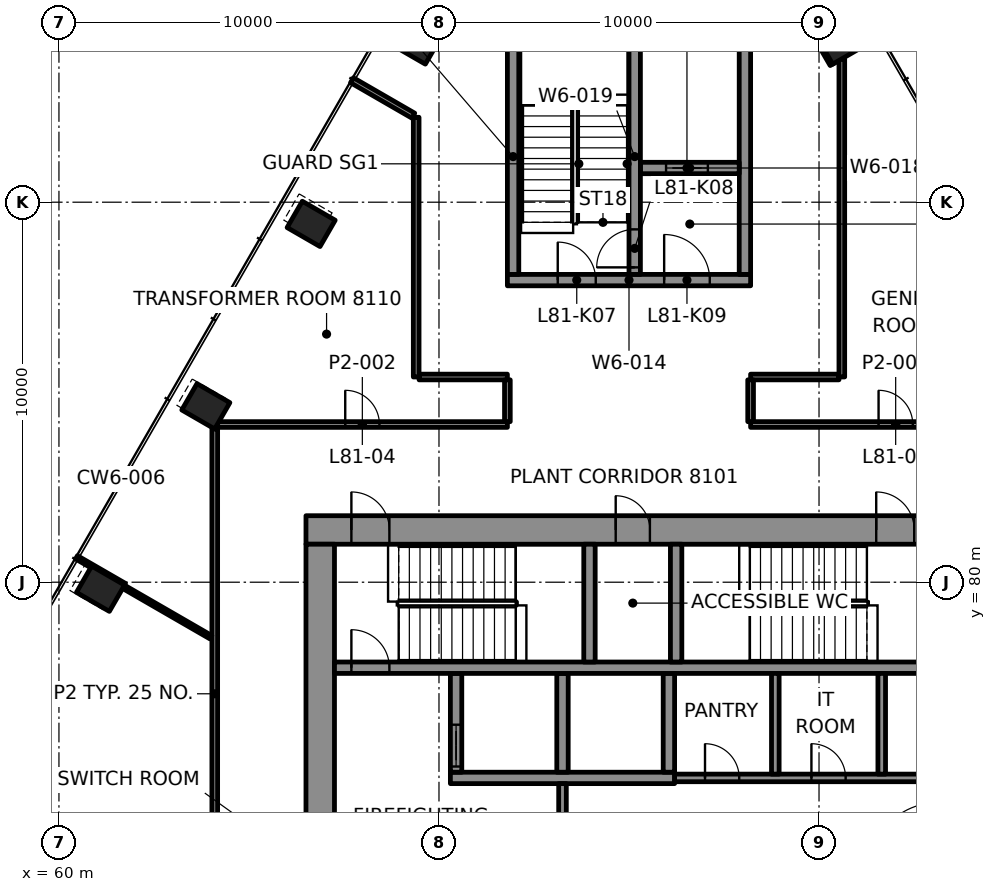
"""IFC4 building model, lengths in metres.
Left out: names, types, materials, properties, quantities, classifications, styles, units other than length and angle.
Written with IfcOpenShell. Run it as: python <this file> out.ifc"""

import sys

from ifc_helpers import new_model, si_unit, direction, frame, frame_2d, origin, origin_2d, place, context, subcontext, project, spatial, rectangle, hollow_rectangle, extrude, element, fill, save


model = new_model("IFC4")
c1 = context("Model", 3, precision=1e-05, world=origin(), true_north=direction((0.0, 1.0)))
c2 = subcontext(c1, "Body", "Model", "MODEL_VIEW")
j1 = project(units=[si_unit("LENGTHUNIT", "METRE"), si_unit("PLANEANGLEUNIT", "RADIAN")], contexts=[c1])
p1 = place(None, origin())
s1 = spatial("IfcSite", under=j1, at=p1, CompositionType="ELEMENT")
p2 = place(p1, origin())
s2 = spatial("IfcBuilding", under=s1, at=p2, CompositionType="ELEMENT")
p3 = place(p2, frame((0.0, 0.0, 331.6)))
s3 = spatial("IfcBuildingStorey", under=s2, at=p3, CompositionType="ELEMENT", Elevation=331.6)
for number, where, z_axis, x_axis in (
    (1, (80.592, 94.229, -0.0), (0.0, 0.0, 1.0), (-0.5, 0.866, 0.0)),
    (2, (69.408, 94.229, -0.0), (0.0, 0.0, 1.0), (-0.5, -0.866, 0.0)),
    (3, (66.636, 89.429, -0.0), (0.0, 0.0, 1.0), (-0.5, -0.866, 0.0)),
    (4, (63.865, 84.629, -0.0), (0.0, 0.0, 1.0), (-0.5, -0.866, 0.0)),
    (5, (61.094, 79.829, -0.0), (0.0, 0.0, 1.0), (-0.5, -0.866, 0.0)),
):
    element("IfcColumn", number, at=place(p3, frame(where, z_axis=z_axis, x_axis=x_axis)), inside=s3, PredefinedType="COLUMN", context=c2, shape_type="SweptSolid", body=[
        extrude(hollow_rectangle(XDim=0.8, YDim=1.0, WallThickness=0.05, at=origin_2d()), origin(), (0.0, 0.0, 1.0), 4.0),
    ])
p4 = place(p3, frame((66.5, 81.375, 0.0), z_axis=(0.0, 0.0, 1.0), x_axis=(1.0, 0.0, 0.0)))
e6 = element("IfcWall", 6, at=p4, inside=s3, PredefinedType="SHEAR", context=c2, shape_type="SweptSolid", body=[
    extrude(rectangle(XDim=17.0, YDim=0.75, at=frame_2d((8.5, 0.0))), origin(), (0.0, 0.0, 1.0), 3.7),
])
p5 = place(p4, frame((1.195, 0.0, 0.0)))
e7 = element("IfcOpeningElement", 7, at=p5, cuts=e6, PredefinedType="OPENING", context=c2, shape_type="SweptSolid", body=[
    extrude(rectangle(XDim=1.0, YDim=2.1, at=frame_2d((0.5, 1.05))), frame((0.0, 0.385, 0.0), z_axis=(0.0, -1.0, 0.0), x_axis=(1.0, 0.0, 0.0)), (0.0, 0.0, 1.0), 0.77),
])
p6 = place(p4, frame((15.005, 0.0, 0.0)))
e8 = element("IfcOpeningElement", 8, at=p6, cuts=e6, PredefinedType="OPENING", context=c2, shape_type="SweptSolid", body=[
    extrude(rectangle(XDim=1.0, YDim=2.1, at=frame_2d((0.5, 1.05))), frame((0.0, 0.385, 0.0), z_axis=(0.0, -1.0, 0.0), x_axis=(1.0, 0.0, 0.0)), (0.0, 0.0, 1.0), 0.77),
])
p7 = place(p4, frame((8.15, 0.0, 0.0)))
e9 = element("IfcOpeningElement", 9, at=p7, cuts=e6, PredefinedType="OPENING", context=c2, shape_type="SweptSolid", body=[
    extrude(rectangle(XDim=0.9, YDim=2.1, at=frame_2d((0.45, 1.05))), frame((0.0, 0.385, 0.0), z_axis=(0.0, -1.0, 0.0), x_axis=(1.0, 0.0, 0.0)), (0.0, 0.0, 1.0), 0.77),
])
p8 = place(p3, frame((66.875, 69.0, 0.0), z_axis=(0.0, 0.0, 1.0), x_axis=(0.0, 1.0, 0.0)))
e10 = element("IfcWall", 10, at=p8, inside=s3, PredefinedType="SHEAR", context=c2, shape_type="SweptSolid", body=[
    extrude(rectangle(XDim=12.0, YDim=0.75, at=frame_2d((6.0, 0.0))), origin(), (0.0, 0.0, 1.0), 3.7),
])
p9 = place(p8, frame((3.7, 0.0, 0.0)))
e11 = element("IfcOpeningElement", 11, at=p9, cuts=e10, PredefinedType="OPENING", context=c2, shape_type="SweptSolid", body=[
    extrude(rectangle(XDim=1.2, YDim=2.1, at=frame_2d((0.6, 1.05))), frame((0.0, 0.385, 0.0), z_axis=(0.0, -1.0, 0.0), x_axis=(1.0, 0.0, 0.0)), (0.0, 0.0, 1.0), 0.77),
])
p10 = place(p8, frame((0.925, 0.0, 0.0)))
e12 = element("IfcOpeningElement", 12, at=p10, cuts=e10, PredefinedType="OPENING", context=c2, shape_type="SweptSolid", body=[
    extrude(rectangle(XDim=0.9, YDim=2.1, at=frame_2d((0.45, 1.05))), frame((0.0, 0.385, 0.0), z_axis=(0.0, -1.0, 0.0), x_axis=(1.0, 0.0, 0.0)), (0.0, 0.0, 1.0), 0.77),
])
p11 = place(p3, frame((70.3, 74.85, 0.0), z_axis=(0.0, 0.0, 1.0), x_axis=(1.0, 0.0, 0.0)))
e13 = element("IfcWall", 13, at=p11, inside=s3, PredefinedType="SHEAR", context=c2, shape_type="SweptSolid", body=[
    extrude(rectangle(XDim=5.9, YDim=0.3, at=frame_2d((2.95, 0.0))), origin(), (0.0, 0.0, 1.0), 3.7),
])
p12 = place(p3, frame((70.45, 75.0, 0.0), z_axis=(0.0, 0.0, 1.0), x_axis=(0.0, 1.0, 0.0)))
e14 = element("IfcWall", 14, at=p12, inside=s3, PredefinedType="SHEAR", context=c2, shape_type="SweptSolid", body=[
    extrude(rectangle(XDim=2.6, YDim=0.3, at=frame_2d((1.3, 0.0))), origin(), (0.0, 0.0, 1.0), 3.7),
])
p13 = place(p12, frame((0.15, 0.0, 0.0)))
e15 = element("IfcOpeningElement", 15, at=p13, cuts=e14, PredefinedType="OPENING", context=c2, shape_type="SweptSolid", body=[
    extrude(rectangle(XDim=1.1, YDim=2.1, at=frame_2d((0.55, 1.05))), frame((0.0, 0.16, 0.0), z_axis=(0.0, -1.0, 0.0), x_axis=(1.0, 0.0, 0.0)), (0.0, 0.0, 1.0), 0.32),
])
for number, where, z_axis, x_axis in (
    (16, (73.25, 75.0, 0.0), (0.0, 0.0, 1.0), (0.0, 1.0, 0.0)),
    (17, (76.05, 75.0, 0.0), (0.0, 0.0, 1.0), (0.0, 1.0, 0.0)),
):
    element("IfcWall", number, at=place(p3, frame(where, z_axis=z_axis, x_axis=x_axis)), inside=s3, PredefinedType="SHEAR", context=c2, shape_type="SweptSolid", body=[
        extrude(rectangle(XDim=2.6, YDim=0.3, at=frame_2d((1.3, 0.0))), origin(), (0.0, 0.0, 1.0), 3.7),
    ])
p14 = place(p3, frame((67.25, 77.75, 0.0), z_axis=(0.0, 0.0, 1.0), x_axis=(1.0, 0.0, 0.0)))
e18 = element("IfcWall", 18, at=p14, inside=s3, PredefinedType="SHEAR", context=c2, shape_type="SweptSolid", body=[
    extrude(rectangle(XDim=15.5, YDim=0.3, at=frame_2d((7.75, 0.0))), origin(), (0.0, 0.0, 1.0), 3.7),
])
p15 = place(p14, frame((0.445, 0.0, 0.0)))
e19 = element("IfcOpeningElement", 19, at=p15, cuts=e18, PredefinedType="OPENING", context=c2, shape_type="SweptSolid", body=[
    extrude(rectangle(XDim=1.0, YDim=2.1, at=frame_2d((0.5, 1.05))), frame((0.0, 0.16, 0.0), z_axis=(0.0, -1.0, 0.0), x_axis=(1.0, 0.0, 0.0)), (0.0, 0.0, 1.0), 0.32),
])
for number, where, z_axis, x_axis in (
    (20, (73.96, 77.9, 0.0), (0.0, 0.0, 1.0), (0.0, 1.0, 0.0)),
    (21, (76.24, 77.9, 0.0), (0.0, 0.0, 1.0), (0.0, 1.0, 0.0)),
):
    element("IfcWall", number, at=place(p3, frame(where, z_axis=z_axis, x_axis=x_axis)), inside=s3, PredefinedType="SHEAR", context=c2, shape_type="SweptSolid", body=[
        extrude(rectangle(XDim=3.1, YDim=0.3, at=frame_2d((1.55, 0.0))), origin(), (0.0, 0.0, 1.0), 3.7),
    ])
p16 = place(p3, frame((71.8, 87.95, 0.0), z_axis=(0.0, 0.0, 1.0), x_axis=(1.0, 0.0, 0.0)))
e22 = element("IfcWall", 22, at=p16, inside=s3, PredefinedType="SHEAR", context=c2, shape_type="SweptSolid", body=[
    extrude(rectangle(XDim=6.4, YDim=0.3, at=frame_2d((3.2, 0.0))), origin(), (0.0, 0.0, 1.0), 3.7),
])
p17 = place(p16, frame((1.325, 0.0, 0.0)))
e23 = element("IfcOpeningElement", 23, at=p17, cuts=e22, PredefinedType="OPENING", context=c2, shape_type="SweptSolid", body=[
    extrude(rectangle(XDim=1.0, YDim=2.1, at=frame_2d((0.5, 1.05))), frame((0.0, 0.16, 0.0), z_axis=(0.0, -1.0, 0.0), x_axis=(1.0, 0.0, 0.0)), (0.0, 0.0, 1.0), 0.32),
])
p18 = place(p16, frame((4.125, 0.0, 0.0)))
e24 = element("IfcOpeningElement", 24, at=p18, cuts=e22, PredefinedType="OPENING", context=c2, shape_type="SweptSolid", body=[
    extrude(rectangle(XDim=1.2, YDim=2.1, at=frame_2d((0.6, 1.05))), frame((0.0, 0.16, 0.0), z_axis=(0.0, -1.0, 0.0), x_axis=(1.0, 0.0, 0.0)), (0.0, 0.0, 1.0), 0.32),
])
for number, where, z_axis, x_axis in (
    (25, (71.95, 88.1, 0.0), (0.0, 0.0, 1.0), (0.0, 1.0, 0.0)),
    (26, (78.05, 88.1, 0.0), (0.0, 0.0, 1.0), (0.0, 1.0, 0.0)),
):
    element("IfcWall", number, at=place(p3, frame(where, z_axis=z_axis, x_axis=x_axis)), inside=s3, PredefinedType="SHEAR", context=c2, shape_type="SweptSolid", body=[
        extrude(rectangle(XDim=6.2, YDim=0.3, at=frame_2d((3.1, 0.0))), origin(), (0.0, 0.0, 1.0), 3.7),
    ])
p19 = place(p3, frame((75.3, 90.9, 0.0), z_axis=(0.0, 0.0, 1.0), x_axis=(1.0, 0.0, 0.0)))
e27 = element("IfcWall", 27, at=p19, inside=s3, PredefinedType="SHEAR", context=c2, shape_type="SweptSolid", body=[
    extrude(rectangle(XDim=2.6, YDim=0.3, at=frame_2d((1.3, 0.0))), origin(), (0.0, 0.0, 1.0), 3.7),
])
p20 = place(p19, frame((0.675, 0.0, 0.0)))
e28 = element("IfcOpeningElement", 28, at=p20, cuts=e27, PredefinedType="OPENING", context=c2, shape_type="SweptSolid", body=[
    extrude(rectangle(XDim=1.1, YDim=2.1, at=frame_2d((0.55, 1.05))), frame((0.0, 0.16, 0.0), z_axis=(0.0, -1.0, 0.0), x_axis=(1.0, 0.0, 0.0)), (0.0, 0.0, 1.0), 0.32),
])
p21 = place(p3, frame((75.15, 88.1, 0.0), z_axis=(0.0, 0.0, 1.0), x_axis=(0.0, 1.0, 0.0)))
e29 = element("IfcWall", 29, at=p21, inside=s3, PredefinedType="SHEAR", context=c2, shape_type="SweptSolid", body=[
    extrude(rectangle(XDim=6.2, YDim=0.3, at=frame_2d((3.1, 0.0))), origin(), (0.0, 0.0, 1.0), 3.7),
])
p22 = place(p21, frame((0.185, 0.0, 0.0)))
e30 = element("IfcOpeningElement", 30, at=p22, cuts=e29, PredefinedType="OPENING", context=c2, shape_type="SweptSolid", body=[
    extrude(rectangle(XDim=1.0, YDim=2.1, at=frame_2d((0.5, 1.05))), frame((0.0, 0.16, 0.0), z_axis=(0.0, -1.0, 0.0), x_axis=(1.0, 0.0, 0.0)), (0.0, 0.0, 1.0), 0.32),
])
p23 = place(p3, frame((64.166, 84.15, 0.0), z_axis=(0.0, 0.0, 1.0), x_axis=(1.0, 0.0, 0.0)))
e31 = element("IfcWall", 31, at=p23, inside=s3, PredefinedType="PARTITIONING", context=c2, shape_type="SweptSolid", body=[
    extrude(rectangle(XDim=7.634, YDim=0.15, at=frame_2d((3.817, 0.0))), origin(), (0.0, 0.0, 1.0), 3.1),
])
p24 = place(p23, frame((3.367, 0.0, 0.0)))
e32 = element("IfcOpeningElement", 32, at=p24, cuts=e31, PredefinedType="OPENING", context=c2, shape_type="SweptSolid", body=[
    extrude(rectangle(XDim=0.9, YDim=2.1, at=frame_2d((0.45, 1.05))), frame((0.0, 0.085, 0.0), z_axis=(0.0, -1.0, 0.0), x_axis=(1.0, 0.0, 0.0)), (0.0, 0.0, 1.0), 0.17),
])
p25 = place(p3, frame((78.2, 84.15, 0.0), z_axis=(0.0, 0.0, 1.0), x_axis=(1.0, 0.0, 0.0)))
e33 = element("IfcWall", 33, at=p25, inside=s3, PredefinedType="PARTITIONING", context=c2, shape_type="SweptSolid", body=[
    extrude(rectangle(XDim=7.634, YDim=0.15, at=frame_2d((3.817, 0.0))), origin(), (0.0, 0.0, 1.0), 3.1),
])
p26 = place(p25, frame((3.367, 0.0, 0.0)))
e34 = element("IfcOpeningElement", 34, at=p26, cuts=e33, PredefinedType="OPENING", context=c2, shape_type="SweptSolid", body=[
    extrude(rectangle(XDim=0.9, YDim=2.1, at=frame_2d((0.45, 1.05))), frame((0.0, 0.085, 0.0), z_axis=(0.0, -1.0, 0.0), x_axis=(1.0, 0.0, 0.0)), (0.0, 0.0, 1.0), 0.17),
])
for number, where, z_axis, x_axis in (
    (35, (69.476, 85.4, 0.0), (0.0, 0.0, 1.0), (1.0, 0.0, 0.0)),
    (36, (78.2, 85.4, 0.0), (0.0, 0.0, 1.0), (1.0, 0.0, 0.0)),
):
    element("IfcWall", number, at=place(p3, frame(where, z_axis=z_axis, x_axis=x_axis)), inside=s3, PredefinedType="PARTITIONING", context=c2, shape_type="SweptSolid", body=[
        extrude(rectangle(XDim=2.324, YDim=0.15, at=frame_2d((1.162, 0.0))), origin(), (0.0, 0.0, 1.0), 3.1),
    ])
p27 = place(p3, frame((80.6, 85.401, 0.0), z_axis=(0.0, 0.0, 1.0), x_axis=(0.0, 1.0, 0.0)))
e37 = element("IfcWall", 37, at=p27, inside=s3, PredefinedType="PARTITIONING", context=c2, shape_type="SweptSolid", body=[
    extrude(rectangle(XDim=8.371, YDim=0.15, at=frame_2d((4.185, 0.0))), origin(), (0.0, 0.0, 1.0), 3.1),
])
for number, where, z_axis, x_axis in (
    (38, (78.2, 84.225, 0.0), (0.0, 0.0, 1.0), (0.0, 1.0, 0.0)),
    (39, (71.8, 84.225, 0.0), (0.0, 0.0, 1.0), (0.0, 1.0, 0.0)),
):
    element("IfcWall", number, at=place(p3, frame(where, z_axis=z_axis, x_axis=x_axis)), inside=s3, PredefinedType="PARTITIONING", context=c2, shape_type="SweptSolid", body=[
        extrude(rectangle(XDim=1.1, YDim=0.15, at=frame_2d((0.55, 0.0))), origin(), (0.0, 0.0, 1.0), 3.1),
    ])
p28 = place(p3, frame((69.4, 85.4, 0.0), z_axis=(0.0, 0.0, 1.0), x_axis=(0.0, 1.0, 0.0)))
e40 = element("IfcWall", 40, at=p28, inside=s3, PredefinedType="PARTITIONING", context=c2, shape_type="SweptSolid", body=[
    extrude(rectangle(XDim=6.833, YDim=0.15, at=frame_2d((3.417, 0.0))), origin(), (0.0, 0.0, 1.0), 3.1),
])
p29 = place(p3, frame((64.1, 70.093, 0.0), z_axis=(0.0, 0.0, 1.0), x_axis=(0.0, 1.0, 0.0)))
e41 = element("IfcWall", 41, at=p29, inside=s3, PredefinedType="PARTITIONING", context=c2, shape_type="SweptSolid", body=[
    extrude(rectangle(XDim=13.943, YDim=0.15, at=frame_2d((6.972, 0.0))), origin(), (0.0, 0.0, 1.0), 3.1),
])
p30 = place(p3, frame((80.358, 93.633, 0.0), z_axis=(0.0, 0.0, 1.0), x_axis=(-0.499951716245, 0.866053278629, 0.0)))
e42 = element("IfcWall", 42, at=p30, inside=s3, PredefinedType="PARTITIONING", context=c2, shape_type="SweptSolid", body=[
    extrude(rectangle(XDim=0.799, YDim=0.15, at=frame_2d((0.399, 0.0))), origin(), (0.0, 0.0, 1.0), 3.1),
])
p31 = place(p3, frame((69.325, 92.277, 0.0), z_axis=(0.0, 0.0, 1.0), x_axis=(-0.865993641626, 0.500055009638, 0.0)))
e43 = element("IfcWall", 43, at=p31, inside=s3, PredefinedType="PARTITIONING", context=c2, shape_type="SweptSolid", body=[
    extrude(rectangle(XDim=1.864, YDim=0.15, at=frame_2d((0.932, 0.0))), origin(), (0.0, 0.0, 1.0), 3.088),
])
p32 = place(p3, frame((61.726, 79.925, 0.0), z_axis=(0.0, 0.0, 1.0), x_axis=(-0.866021227388, 0.500007233661, 0.0)))
e44 = element("IfcWall", 44, at=p32, inside=s3, PredefinedType="PARTITIONING", context=c2, shape_type="SweptSolid", body=[
    extrude(rectangle(XDim=1.459, YDim=0.1, at=frame_2d((0.73, 0.0))), origin(), (0.0, 0.0, 1.0), 3.088),
])
p33 = place(p3, frame((63.999, 78.551, 0.0), z_axis=(0.0, 0.0, 1.0), x_axis=(-0.866015557117, 0.50001705454, 0.0)))
e45 = element("IfcWall", 45, at=p33, inside=s3, PredefinedType="PARTITIONING", context=c2, shape_type="SweptSolid", body=[
    extrude(rectangle(XDim=2.654, YDim=0.1, at=frame_2d((1.327, 0.0))), origin(), (0.0, 0.0, 1.0), 3.1),
])
p34 = place(p3, frame((76.2, 74.85, 0.0), z_axis=(0.0, 0.0, 1.0), x_axis=(1.0, 0.0, 0.0)))
e46 = element("IfcWall", 46, at=p34, inside=s3, PredefinedType="PARTITIONING", context=c2, shape_type="SweptSolid", body=[
    extrude(rectangle(XDim=6.55, YDim=0.2, at=frame_2d((3.275, 0.0))), origin(), (0.0, 0.0, 1.0), 3.7),
])
p35 = place(p34, frame((0.8, 0.0, 0.0)))
e47 = element("IfcOpeningElement", 47, at=p35, cuts=e46, PredefinedType="OPENING", context=c2, shape_type="SweptSolid", body=[
    extrude(rectangle(XDim=0.9, YDim=2.1, at=frame_2d((0.45, 1.05))), frame((0.0, 0.11, 0.0), z_axis=(0.0, -1.0, 0.0), x_axis=(1.0, 0.0, 0.0)), (0.0, 0.0, 1.0), 0.22),
])
p36 = place(p34, frame((3.6, 0.0, 0.0)))
e48 = element("IfcOpeningElement", 48, at=p36, cuts=e46, PredefinedType="OPENING", context=c2, shape_type="SweptSolid", body=[
    extrude(rectangle(XDim=0.9, YDim=2.1, at=frame_2d((0.45, 1.05))), frame((0.0, 0.11, 0.0), z_axis=(0.0, -1.0, 0.0), x_axis=(1.0, 0.0, 0.0)), (0.0, 0.0, 1.0), 0.22),
])
p37 = place(p3, frame((73.25, 71.9, 0.0), z_axis=(0.0, 0.0, 1.0), x_axis=(0.0, 1.0, 0.0)))
e49 = element("IfcWall", 49, at=p37, inside=s3, PredefinedType="PARTITIONING", context=c2, shape_type="SweptSolid", body=[
    extrude(rectangle(XDim=2.8, YDim=0.2, at=frame_2d((1.4, 0.0))), origin(), (0.0, 0.0, 1.0), 3.7),
])
p38 = place(p37, frame((0.8, 0.0, 0.0)))
e50 = element("IfcOpeningElement", 50, at=p38, cuts=e49, PredefinedType="OPENING", context=c2, shape_type="SweptSolid", body=[
    extrude(rectangle(XDim=1.2, YDim=2.1, at=frame_2d((0.6, 1.05))), frame((0.0, 0.11, 0.0), z_axis=(0.0, -1.0, 0.0), x_axis=(1.0, 0.0, 0.0)), (0.0, 0.0, 1.0), 0.22),
])
for number, where, z_axis, x_axis in (
    (51, (78.85, 74.95, 0.0), (0.0, 0.0, 1.0), (0.0, 1.0, 0.0)),
    (52, (81.65, 74.95, 0.0), (0.0, 0.0, 1.0), (0.0, 1.0, 0.0)),
):
    element("IfcWall", number, at=place(p3, frame(where, z_axis=z_axis, x_axis=x_axis)), inside=s3, PredefinedType="PARTITIONING", context=c2, shape_type="SweptSolid", body=[
        extrude(rectangle(XDim=2.65, YDim=0.2, at=frame_2d((1.325, 0.0))), origin(), (0.0, 0.0, 1.0), 3.7),
    ])
p39 = place(p24, origin())
e53 = element("IfcDoor", 53, at=p39, inside=s3, OperationType="SINGLE_SWING_LEFT", PredefinedType="DOOR", context=c2, shape_type="SweptSolid", body=[
    extrude(rectangle(XDim=0.9, YDim=2.1, at=frame_2d((0.45, 1.05))), frame((0.0, 0.025, 0.0), z_axis=(0.0, -1.0, 0.0), x_axis=(1.0, 0.0, 0.0)), (0.0, 0.0, 1.0), 0.05),
])
fill(e32, e53)
p40 = place(p26, origin())
e54 = element("IfcDoor", 54, at=p40, inside=s3, OperationType="SINGLE_SWING_LEFT", PredefinedType="DOOR", context=c2, shape_type="SweptSolid", body=[
    extrude(rectangle(XDim=0.9, YDim=2.1, at=frame_2d((0.45, 1.05))), frame((0.0, 0.025, 0.0), z_axis=(0.0, -1.0, 0.0), x_axis=(1.0, 0.0, 0.0)), (0.0, 0.0, 1.0), 0.05),
])
fill(e34, e54)
p41 = place(p13, origin())
e55 = element("IfcDoor", 55, at=p41, inside=s3, OperationType="DOUBLE_DOOR_SLIDING", PredefinedType="DOOR", context=c2, shape_type="SweptSolid", body=[
    extrude(rectangle(XDim=1.1, YDim=2.1, at=frame_2d((0.55, 1.05))), frame((0.0, 0.025, 0.0), z_axis=(0.0, -1.0, 0.0), x_axis=(1.0, 0.0, 0.0)), (0.0, 0.0, 1.0), 0.05),
])
fill(e15, e55)
p42 = place(p20, origin())
e56 = element("IfcDoor", 56, at=p42, inside=s3, OperationType="DOUBLE_DOOR_SLIDING", PredefinedType="DOOR", context=c2, shape_type="SweptSolid", body=[
    extrude(rectangle(XDim=1.1, YDim=2.1, at=frame_2d((0.55, 1.05))), frame((0.0, 0.025, 0.0), z_axis=(0.0, -1.0, 0.0), x_axis=(1.0, 0.0, 0.0)), (0.0, 0.0, 1.0), 0.05),
])
fill(e28, e56)
p43 = place(p15, origin())
e57 = element("IfcDoor", 57, at=p43, inside=s3, OperationType="SINGLE_SWING_LEFT", PredefinedType="DOOR", context=c2, shape_type="SweptSolid", body=[
    extrude(rectangle(XDim=1.0, YDim=2.1, at=frame_2d((0.5, 1.05))), frame((0.0, 0.025, 0.0), z_axis=(0.0, -1.0, 0.0), x_axis=(1.0, 0.0, 0.0)), (0.0, 0.0, 1.0), 0.05),
])
fill(e19, e57)
p44 = place(p5, origin())
e58 = element("IfcDoor", 58, at=p44, inside=s3, OperationType="SINGLE_SWING_RIGHT", PredefinedType="DOOR", context=c2, shape_type="SweptSolid", body=[
    extrude(rectangle(XDim=1.0, YDim=2.1, at=frame_2d((0.5, 1.05))), frame((0.0, 0.095, 0.0), z_axis=(0.0, -1.0, 0.0), x_axis=(1.0, 0.0, 0.0)), (0.0, 0.0, 1.0), 0.19),
])
fill(e7, e58)
p45 = place(p6, origin())
e59 = element("IfcDoor", 59, at=p45, inside=s3, OperationType="SINGLE_SWING_LEFT", PredefinedType="DOOR", context=c2, shape_type="SweptSolid", body=[
    extrude(rectangle(XDim=1.0, YDim=2.1, at=frame_2d((0.5, 1.05))), frame((0.0, 0.095, 0.0), z_axis=(0.0, -1.0, 0.0), x_axis=(1.0, 0.0, 0.0)), (0.0, 0.0, 1.0), 0.19),
])
fill(e8, e59)
p46 = place(p17, origin())
e60 = element("IfcDoor", 60, at=p46, inside=s3, OperationType="SINGLE_SWING_RIGHT", PredefinedType="DOOR", context=c2, shape_type="SweptSolid", body=[
    extrude(rectangle(XDim=1.0, YDim=2.1, at=frame_2d((0.5, 1.05))), frame((0.0, 0.025, 0.0), z_axis=(0.0, -1.0, 0.0), x_axis=(1.0, 0.0, 0.0)), (0.0, 0.0, 1.0), 0.05),
])
fill(e23, e60)
p47 = place(p22, origin())
e61 = element("IfcDoor", 61, at=p47, inside=s3, OperationType="SINGLE_SWING_LEFT", PredefinedType="DOOR", context=c2, shape_type="SweptSolid", body=[
    extrude(rectangle(XDim=1.0, YDim=2.1, at=frame_2d((0.5, 1.05))), frame((0.0, 0.025, 0.0), z_axis=(0.0, -1.0, 0.0), x_axis=(1.0, 0.0, 0.0)), (0.0, 0.0, 1.0), 0.05),
])
fill(e30, e61)
p48 = place(p18, origin())
e62 = element("IfcDoor", 62, at=p48, inside=s3, OperationType="SINGLE_SWING_RIGHT", PredefinedType="DOOR", context=c2, shape_type="SweptSolid", body=[
    extrude(rectangle(XDim=1.2, YDim=2.1, at=frame_2d((0.6, 1.05))), frame((0.0, 0.025, 0.0), z_axis=(0.0, -1.0, 0.0), x_axis=(1.0, 0.0, 0.0)), (0.0, 0.0, 1.0), 0.05),
])
fill(e24, e62)
p49 = place(p35, origin())
e63 = element("IfcDoor", 63, at=p49, inside=s3, OperationType="SINGLE_SWING_RIGHT", PredefinedType="DOOR", context=c2, shape_type="SweptSolid", body=[
    extrude(rectangle(XDim=0.9, YDim=2.1, at=frame_2d((0.45, 1.05))), frame((0.0, 0.025, 0.0), z_axis=(0.0, -1.0, 0.0), x_axis=(1.0, 0.0, 0.0)), (0.0, 0.0, 1.0), 0.05),
])
fill(e47, e63)
p50 = place(p36, origin())
e64 = element("IfcDoor", 64, at=p50, inside=s3, OperationType="SINGLE_SWING_LEFT", PredefinedType="DOOR", context=c2, shape_type="SweptSolid", body=[
    extrude(rectangle(XDim=0.9, YDim=2.1, at=frame_2d((0.45, 1.05))), frame((0.0, 0.025, 0.0), z_axis=(0.0, -1.0, 0.0), x_axis=(1.0, 0.0, 0.0)), (0.0, 0.0, 1.0), 0.05),
])
fill(e48, e64)
p51 = place(p7, origin())
e65 = element("IfcDoor", 65, at=p51, inside=s3, OperationType="SINGLE_SWING_RIGHT", PredefinedType="DOOR", context=c2, shape_type="SweptSolid", body=[
    extrude(rectangle(XDim=0.9, YDim=2.1, at=frame_2d((0.45, 1.05))), frame((0.0, 0.095, 0.0), z_axis=(0.0, -1.0, 0.0), x_axis=(1.0, 0.0, 0.0)), (0.0, 0.0, 1.0), 0.19),
])
fill(e9, e65)
save(model, sys.argv[1])
